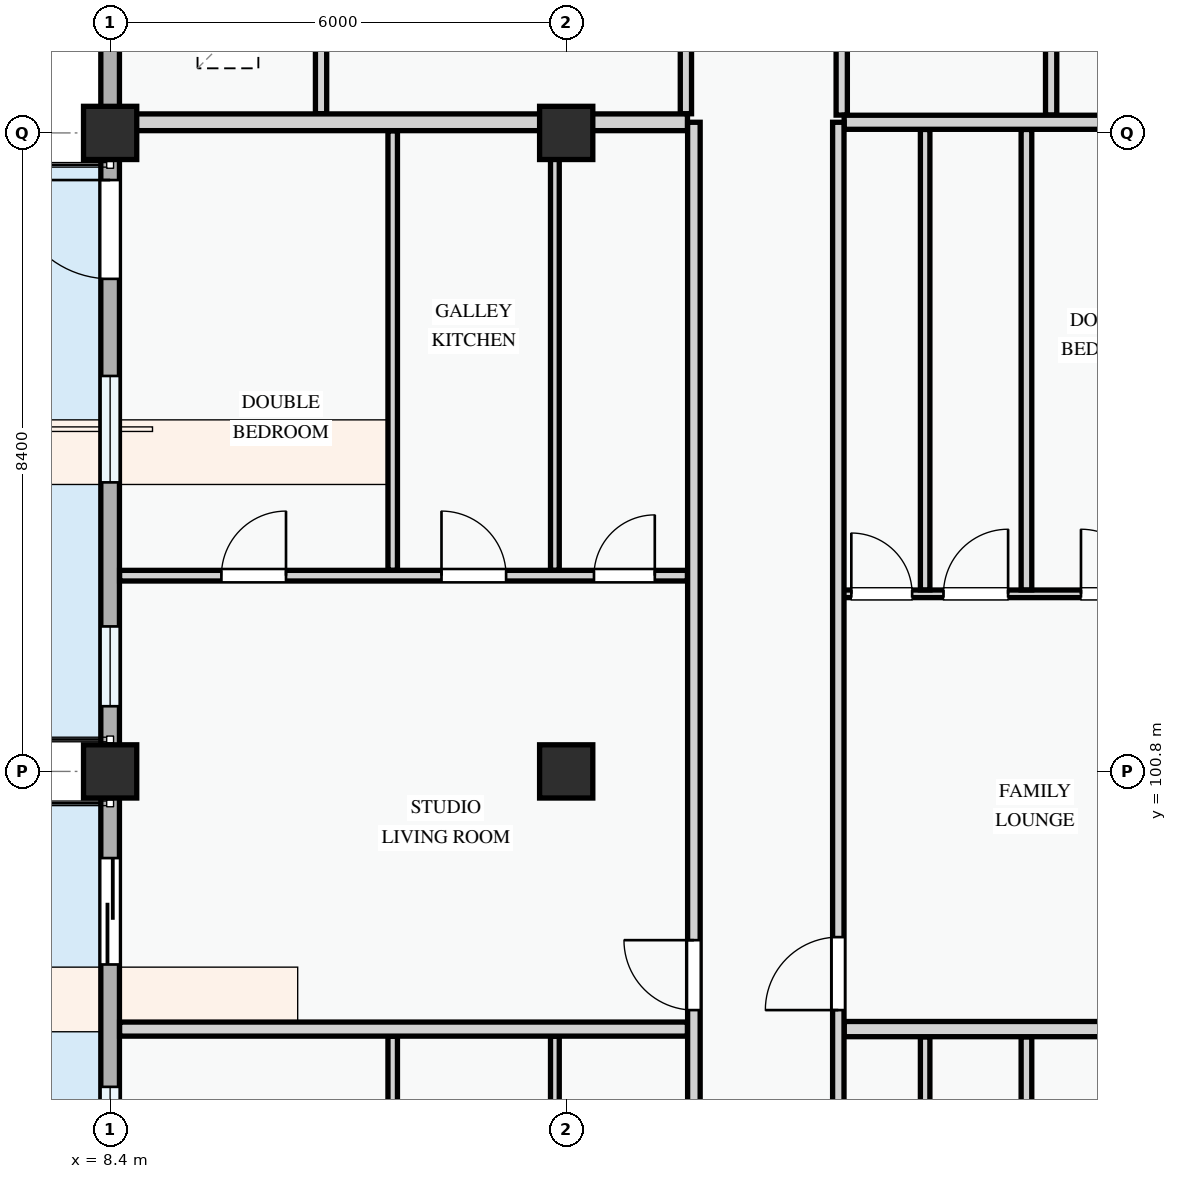
"""IFC4 building model, lengths in metres.
Left out: names, types, materials, properties, quantities, classifications, styles, units other than length and angle.
Written with IfcOpenShell. Run it as: python <this file> out.ifc"""

import sys

from ifc_helpers import new_model, si_unit, direction, frame, frame_2d, origin, origin_2d, place, context, subcontext, project, spatial, rectangle, extrude, element, fill, save


model = new_model("IFC4")
c1 = context("Model", 3, precision=1e-05, world=origin(), true_north=direction((0.0, 1.0)))
c2 = subcontext(c1, "Body", "Model", "MODEL_VIEW")
j1 = project(units=[si_unit("LENGTHUNIT", "METRE"), si_unit("PLANEANGLEUNIT", "RADIAN")], contexts=[c1])
p1 = place(None, origin())
s1 = spatial("IfcSite", under=j1, at=p1, CompositionType="ELEMENT")
p2 = place(p1, origin())
s2 = spatial("IfcBuilding", under=s1, at=p2, CompositionType="ELEMENT")
p3 = place(p2, frame((0.0, 0.0, 8.1)))
s3 = spatial("IfcBuildingStorey", under=s2, at=p3, CompositionType="ELEMENT", Elevation=8.1)
for number, where, z_axis, x_axis in (
    (1, (8.4, 100.8, 0.0), (0.0, 0.0, 1.0), (1.0, 0.0, 0.0)),
    (2, (8.4, 109.2, 0.0), (0.0, 0.0, 1.0), (1.0, 0.0, 0.0)),
    (3, (14.4, 100.8, 0.0), (0.0, 0.0, 1.0), (1.0, 0.0, 0.0)),
    (4, (14.4, 109.2, 0.0), (0.0, 0.0, 1.0), (1.0, 0.0, 0.0)),
):
    element("IfcColumn", number, at=place(p3, frame(where, z_axis=z_axis, x_axis=x_axis)), inside=s3, PredefinedType="COLUMN", context=c2, shape_type="SweptSolid", body=[
        extrude(rectangle(XDim=0.7, YDim=0.7, at=origin_2d()), origin(), (0.0, 0.0, 1.0), 3.3),
    ])
p4 = place(p3, frame((8.4, 115.2, 0.0), z_axis=(0.0, 0.0, 1.0), x_axis=(0.0, -1.0, 0.0)))
e5 = element("IfcWall", 5, at=p4, inside=s3, PredefinedType="STANDARD", context=c2, shape_type="SweptSolid", body=[
    extrude(rectangle(XDim=6.0, YDim=0.245, at=frame_2d((3.0, 0.0))), origin(), (0.0, 0.0, 1.0), 2.445),
])
p5 = place(p4, frame((0.545, 0.0, 0.78)))
e6 = element("IfcOpeningElement", 6, at=p5, cuts=e5, PredefinedType="OPENING", context=c2, shape_type="SweptSolid", body=[
    extrude(rectangle(XDim=0.9, YDim=1.2, at=frame_2d((0.45, 0.6))), frame((0.0, 0.133, 0.0), z_axis=(0.0, -1.0, 0.0), x_axis=(1.0, 0.0, 0.0)), (0.0, 0.0, 1.0), 0.265),
])
p6 = place(p4, frame((3.065, 0.0, 0.78)))
e7 = element("IfcOpeningElement", 7, at=p6, cuts=e5, PredefinedType="OPENING", context=c2, shape_type="SweptSolid", body=[
    extrude(rectangle(XDim=1.48, YDim=1.52, at=frame_2d((0.74, 0.76))), frame((0.0, 0.133, 0.0), z_axis=(0.0, -1.0, 0.0), x_axis=(1.0, 0.0, 0.0)), (0.0, 0.0, 1.0), 0.265),
])
p7 = place(p3, frame((8.4, 109.2, 0.0), z_axis=(0.0, 0.0, 1.0), x_axis=(0.0, -1.0, 0.0)))
e8 = element("IfcWall", 8, at=p7, inside=s3, PredefinedType="STANDARD", context=c2, shape_type="SweptSolid", body=[
    extrude(rectangle(XDim=8.4, YDim=0.245, at=frame_2d((4.2, 0.0))), origin(), (0.0, 0.0, 1.0), 2.345),
])
p8 = place(p7, frame((0.62, 0.0, 0.0)))
e9 = element("IfcOpeningElement", 9, at=p8, cuts=e8, PredefinedType="OPENING", context=c2, shape_type="SweptSolid", body=[
    extrude(rectangle(XDim=1.3, YDim=2.15, at=frame_2d((0.65, 1.075))), frame((0.0, 0.133, 0.0), z_axis=(0.0, -1.0, 0.0), x_axis=(1.0, 0.0, 0.0)), (0.0, 0.0, 1.0), 0.265),
])
p9 = place(p7, frame((3.198, 0.0, 0.78)))
e10 = element("IfcOpeningElement", 10, at=p9, cuts=e8, PredefinedType="OPENING", context=c2, shape_type="SweptSolid", body=[
    extrude(rectangle(XDim=1.4, YDim=1.45, at=frame_2d((0.7, 0.725))), frame((0.0, 0.133, 0.0), z_axis=(0.0, -1.0, 0.0), x_axis=(1.0, 0.0, 0.0)), (0.0, 0.0, 1.0), 0.265),
])
p10 = place(p7, frame((6.492, 0.0, 0.78)))
e11 = element("IfcOpeningElement", 11, at=p10, cuts=e8, PredefinedType="OPENING", context=c2, shape_type="SweptSolid", body=[
    extrude(rectangle(XDim=1.05, YDim=1.2, at=frame_2d((0.525, 0.6))), frame((0.0, 0.133, 0.0), z_axis=(0.0, -1.0, 0.0), x_axis=(1.0, 0.0, 0.0)), (0.0, 0.0, 1.0), 0.265),
])
p11 = place(p3, frame((8.4, 100.8, 0.0), z_axis=(0.0, 0.0, 1.0), x_axis=(0.0, -1.0, 0.0)))
e12 = element("IfcWall", 12, at=p11, inside=s3, PredefinedType="STANDARD", context=c2, shape_type="SweptSolid", body=[
    extrude(rectangle(XDim=6.0, YDim=0.245, at=frame_2d((3.0, 0.0))), origin(), (0.0, 0.0, 1.0), 2.445),
])
p12 = place(p11, frame((1.14, 0.0, 0.0)))
e13 = element("IfcOpeningElement", 13, at=p12, cuts=e12, PredefinedType="OPENING", context=c2, shape_type="SweptSolid", body=[
    extrude(rectangle(XDim=1.4, YDim=2.2, at=frame_2d((0.7, 1.1))), frame((0.0, 0.133, 0.0), z_axis=(0.0, -1.0, 0.0), x_axis=(1.0, 0.0, 0.0)), (0.0, 0.0, 1.0), 0.265),
])
p13 = place(p11, frame((4.15, 0.0, 0.78)))
e14 = element("IfcOpeningElement", 14, at=p13, cuts=e12, PredefinedType="OPENING", context=c2, shape_type="SweptSolid", body=[
    extrude(rectangle(XDim=0.9, YDim=1.2, at=frame_2d((0.45, 0.6))), frame((0.0, 0.133, 0.0), z_axis=(0.0, -1.0, 0.0), x_axis=(1.0, 0.0, 0.0)), (0.0, 0.0, 1.0), 0.265),
])
for number, where, z_axis, x_axis in (
    (15, (11.175, 113.324, 0.0), (0.0, 0.0, 1.0), (0.0, -1.0, 0.0)),
    (16, (15.975, 113.324, 0.0), (0.0, 0.0, 1.0), (0.0, -1.0, 0.0)),
):
    element("IfcWall", number, at=place(p3, frame(where, z_axis=z_axis, x_axis=x_axis)), inside=s3, PredefinedType="PARTITIONING", context=c2, shape_type="SweptSolid", body=[
        extrude(rectangle(XDim=3.872, YDim=0.148, at=frame_2d((1.936, 0.0))), origin(), (0.0, 0.0, 1.0), 3.0),
    ])
for number, where, z_axis, x_axis in (
    (17, (18.025, 113.324, 0.0), (0.0, 0.0, 1.0), (0.0, -1.0, 0.0)),
    (18, (20.78, 113.324, 0.0), (0.0, 0.0, 1.0), (0.0, -1.0, 0.0)),
):
    element("IfcWall", number, at=place(p3, frame(where, z_axis=z_axis, x_axis=x_axis)), inside=s3, PredefinedType="PARTITIONING", context=c2, shape_type="SweptSolid", body=[
        extrude(rectangle(XDim=3.889, YDim=0.148, at=frame_2d((1.945, 0.0))), origin(), (0.0, 0.0, 1.0), 3.0),
    ])
p14 = place(p3, frame((12.118, 91.097, 0.0), z_axis=(0.0, 0.0, 1.0), x_axis=(0.0, 1.0, 0.0)))
e19 = element("IfcWall", 19, at=p14, inside=s3, PredefinedType="PARTITIONING", context=c2, shape_type="SweptSolid", body=[
    extrude(rectangle(XDim=6.219, YDim=0.125, at=frame_2d((3.109, 0.0))), origin(), (0.0, 0.0, 1.0), 3.0),
])
p15 = place(p3, frame((14.251, 91.097, 0.0), z_axis=(0.0, 0.0, 1.0), x_axis=(0.0, 1.0, 0.0)))
e20 = element("IfcWall", 20, at=p15, inside=s3, PredefinedType="PARTITIONING", context=c2, shape_type="SweptSolid", body=[
    extrude(rectangle(XDim=6.219, YDim=0.115, at=frame_2d((3.109, 0.0))), origin(), (0.0, 0.0, 1.0), 2.425),
])
p16 = place(p3, frame((20.455, 90.822, 0.0), z_axis=(0.0, 0.0, 1.0), x_axis=(0.0, 1.0, 0.0)))
e21 = element("IfcWall", 21, at=p16, inside=s3, PredefinedType="PARTITIONING", context=c2, shape_type="SweptSolid", body=[
    extrude(rectangle(XDim=6.487, YDim=0.14, at=frame_2d((3.243, 0.0))), origin(), (0.0, 0.0, 1.0), 3.0),
])
p17 = place(p3, frame((19.122, 90.822, 0.0), z_axis=(0.0, 0.0, 1.0), x_axis=(0.0, 1.0, 0.0)))
e22 = element("IfcWall", 22, at=p17, inside=s3, PredefinedType="PARTITIONING", context=c2, shape_type="SweptSolid", body=[
    extrude(rectangle(XDim=6.487, YDim=0.125, at=frame_2d((3.243, 0.0))), origin(), (0.0, 0.0, 1.0), 3.0),
])
p18 = place(p3, frame((8.524, 103.375, 0.0), z_axis=(0.0, 0.0, 1.0), x_axis=(1.0, 0.0, 0.0)))
e23 = element("IfcWall", 23, at=p18, inside=s3, PredefinedType="PARTITIONING", context=c2, shape_type="SweptSolid", body=[
    extrude(rectangle(XDim=7.471, YDim=0.14, at=frame_2d((3.736, 0.0))), origin(), (0.0, 0.0, 1.0), 3.0),
])
p19 = place(p18, frame((1.339, 0.0, 0.0)))
e24 = element("IfcOpeningElement", 24, at=p19, cuts=e23, PredefinedType="OPENING", context=c2, shape_type="SweptSolid", body=[
    extrude(rectangle(XDim=0.85, YDim=2.1, at=frame_2d((0.425, 1.05))), frame((0.0, 0.08, 0.0), z_axis=(0.0, -1.0, 0.0), x_axis=(1.0, 0.0, 0.0)), (0.0, 0.0, 1.0), 0.16),
])
p20 = place(p18, frame((4.235, 0.0, 0.0)))
e25 = element("IfcOpeningElement", 25, at=p20, cuts=e23, PredefinedType="OPENING", context=c2, shape_type="SweptSolid", body=[
    extrude(rectangle(XDim=0.85, YDim=2.1, at=frame_2d((0.425, 1.05))), frame((0.0, 0.08, 0.0), z_axis=(0.0, -1.0, 0.0), x_axis=(1.0, 0.0, 0.0)), (0.0, 0.0, 1.0), 0.16),
])
p21 = place(p18, frame((6.241, 0.0, 0.0)))
e26 = element("IfcOpeningElement", 26, at=p21, cuts=e23, PredefinedType="OPENING", context=c2, shape_type="SweptSolid", body=[
    extrude(rectangle(XDim=0.8, YDim=2.1, at=frame_2d((0.4, 1.05))), frame((0.0, 0.08, 0.0), z_axis=(0.0, -1.0, 0.0), x_axis=(1.0, 0.0, 0.0)), (0.0, 0.0, 1.0), 0.16),
])
p22 = place(p3, frame((12.118, 103.447, 0.0), z_axis=(0.0, 0.0, 1.0), x_axis=(0.0, 1.0, 0.0)))
e27 = element("IfcWall", 27, at=p22, inside=s3, PredefinedType="PARTITIONING", context=c2, shape_type="SweptSolid", body=[
    extrude(rectangle(XDim=5.781, YDim=0.125, at=frame_2d((2.891, 0.0))), origin(), (0.0, 0.0, 1.0), 3.0),
])
p23 = place(p3, frame((14.251, 103.447, 0.0), z_axis=(0.0, 0.0, 1.0), x_axis=(0.0, 1.0, 0.0)))
e28 = element("IfcWall", 28, at=p23, inside=s3, PredefinedType="PARTITIONING", context=c2, shape_type="SweptSolid", body=[
    extrude(rectangle(XDim=5.781, YDim=0.115, at=frame_2d((2.891, 0.0))), origin(), (0.0, 0.0, 1.0), 2.425),
])
p24 = place(p3, frame((17.98, 103.136, 0.0), z_axis=(0.0, 0.0, 1.0), x_axis=(1.0, 0.0, 0.0)))
e29 = element("IfcWall", 29, at=p24, inside=s3, PredefinedType="PARTITIONING", context=c2, shape_type="SweptSolid", body=[
    extrude(rectangle(XDim=4.696, YDim=0.1, at=frame_2d((2.348, 0.0))), origin(), (0.0, 0.0, 1.0), 3.0),
])
p25 = place(p24, frame((0.171, 0.0, 0.0)))
e30 = element("IfcOpeningElement", 30, at=p25, cuts=e29, PredefinedType="OPENING", context=c2, shape_type="SweptSolid", body=[
    extrude(rectangle(XDim=0.8, YDim=2.1, at=frame_2d((0.4, 1.05))), frame((0.0, 0.06, 0.0), z_axis=(0.0, -1.0, 0.0), x_axis=(1.0, 0.0, 0.0)), (0.0, 0.0, 1.0), 0.12),
])
p26 = place(p24, frame((1.384, 0.0, 0.0)))
e31 = element("IfcOpeningElement", 31, at=p26, cuts=e29, PredefinedType="OPENING", context=c2, shape_type="SweptSolid", body=[
    extrude(rectangle(XDim=0.85, YDim=2.1, at=frame_2d((0.425, 1.05))), frame((0.0, 0.06, 0.0), z_axis=(0.0, -1.0, 0.0), x_axis=(1.0, 0.0, 0.0)), (0.0, 0.0, 1.0), 0.12),
])
p27 = place(p24, frame((3.193, 0.0, 0.0)))
e32 = element("IfcOpeningElement", 32, at=p27, cuts=e29, PredefinedType="OPENING", context=c2, shape_type="SweptSolid", body=[
    extrude(rectangle(XDim=0.85, YDim=2.1, at=frame_2d((0.425, 1.05))), frame((0.0, 0.06, 0.0), z_axis=(0.0, -1.0, 0.0), x_axis=(1.0, 0.0, 0.0)), (0.0, 0.0, 1.0), 0.12),
])
p28 = place(p3, frame((20.455, 103.188, 0.0), z_axis=(0.0, 0.0, 1.0), x_axis=(0.0, 1.0, 0.0)))
e33 = element("IfcWall", 33, at=p28, inside=s3, PredefinedType="PARTITIONING", context=c2, shape_type="SweptSolid", body=[
    extrude(rectangle(XDim=6.057, YDim=0.14, at=frame_2d((3.029, 0.0))), origin(), (0.0, 0.0, 1.0), 3.0),
])
p29 = place(p3, frame((19.122, 103.188, 0.0), z_axis=(0.0, 0.0, 1.0), x_axis=(0.0, 1.0, 0.0)))
e34 = element("IfcWall", 34, at=p29, inside=s3, PredefinedType="PARTITIONING", context=c2, shape_type="SweptSolid", body=[
    extrude(rectangle(XDim=6.057, YDim=0.125, at=frame_2d((3.029, 0.0))), origin(), (0.0, 0.0, 1.0), 3.0),
])
p30 = place(p3, frame((8.524, 97.41, 0.0), z_axis=(0.0, 0.0, 1.0), x_axis=(1.0, 0.0, 0.0)))
e35 = element("IfcWall", 35, at=p30, inside=s3, PredefinedType="PARTITIONING", context=c2, shape_type="SweptSolid", body=[
    extrude(rectangle(XDim=7.471, YDim=0.185, at=frame_2d((3.736, 0.0))), origin(), (0.0, 0.0, 1.0), 3.0),
])
p31 = place(p3, frame((18.057, 97.41, 0.0), z_axis=(0.0, 0.0, 1.0), x_axis=(1.0, 0.0, 0.0)))
e36 = element("IfcWall", 36, at=p31, inside=s3, PredefinedType="PARTITIONING", context=c2, shape_type="SweptSolid", body=[
    extrude(rectangle(XDim=4.619, YDim=0.2, at=frame_2d((2.309, 0.0))), origin(), (0.0, 0.0, 1.0), 3.0),
])
p32 = place(p3, frame((8.524, 109.34, 0.0), z_axis=(0.0, 0.0, 1.0), x_axis=(1.0, 0.0, 0.0)))
e37 = element("IfcWall", 37, at=p32, inside=s3, PredefinedType="PARTITIONING", context=c2, shape_type="SweptSolid", body=[
    extrude(rectangle(XDim=7.471, YDim=0.22, at=frame_2d((3.736, 0.0))), origin(), (0.0, 0.0, 1.0), 2.375),
])
p33 = place(p3, frame((18.057, 109.34, 0.0), z_axis=(0.0, 0.0, 1.0), x_axis=(1.0, 0.0, 0.0)))
e38 = element("IfcWall", 38, at=p33, inside=s3, PredefinedType="PARTITIONING", context=c2, shape_type="SweptSolid", body=[
    extrude(rectangle(XDim=4.683, YDim=0.185, at=frame_2d((2.342, 0.0))), origin(), (0.0, 0.0, 1.0), 2.375),
])
p34 = place(p3, frame((16.08, 72.125, 0.0), z_axis=(0.0, 0.0, 1.0), x_axis=(0.0, 1.0, 0.0)))
e39 = element("IfcWall", 39, at=p34, inside=s3, PredefinedType="PARTITIONING", context=c2, shape_type="SweptSolid", body=[
    extrude(rectangle(XDim=37.216, YDim=0.165, at=frame_2d((18.608, 0.0))), origin(), (0.0, 0.0, 1.0), 3.0),
])
p35 = place(p34, frame((3.657, 0.0, 0.0)))
e40 = element("IfcOpeningElement", 40, at=p35, cuts=e39, PredefinedType="OPENING", context=c2, shape_type="SweptSolid", body=[
    extrude(rectangle(XDim=0.96, YDim=2.12, at=frame_2d((0.48, 1.06))), frame((0.0, 0.093, 0.0), z_axis=(0.0, -1.0, 0.0), x_axis=(1.0, 0.0, 0.0)), (0.0, 0.0, 1.0), 0.185),
])
p36 = place(p34, frame((17.69, 0.0, 0.0)))
e41 = element("IfcOpeningElement", 41, at=p36, cuts=e39, PredefinedType="OPENING", context=c2, shape_type="SweptSolid", body=[
    extrude(rectangle(XDim=0.92, YDim=2.1, at=frame_2d((0.46, 1.05))), frame((0.0, 0.093, 0.0), z_axis=(0.0, -1.0, 0.0), x_axis=(1.0, 0.0, 0.0)), (0.0, 0.0, 1.0), 0.185),
])
p37 = place(p34, frame((25.535, 0.0, 0.0)))
e42 = element("IfcOpeningElement", 42, at=p37, cuts=e39, PredefinedType="OPENING", context=c2, shape_type="SweptSolid", body=[
    extrude(rectangle(XDim=0.92, YDim=2.1, at=frame_2d((0.46, 1.05))), frame((0.0, 0.093, 0.0), z_axis=(0.0, -1.0, 0.0), x_axis=(1.0, 0.0, 0.0)), (0.0, 0.0, 1.0), 0.185),
])
p38 = place(p3, frame((17.98, 72.125, 0.0), z_axis=(0.0, 0.0, 1.0), x_axis=(0.0, 1.0, 0.0)))
e43 = element("IfcWall", 43, at=p38, inside=s3, PredefinedType="PARTITIONING", context=c2, shape_type="SweptSolid", body=[
    extrude(rectangle(XDim=37.216, YDim=0.15, at=frame_2d((18.608, 0.0))), origin(), (0.0, 0.0, 1.0), 3.0),
])
p39 = place(p38, frame((3.619, 0.0, 0.0)))
e44 = element("IfcOpeningElement", 44, at=p39, cuts=e43, PredefinedType="OPENING", context=c2, shape_type="SweptSolid", body=[
    extrude(rectangle(XDim=0.92, YDim=2.1, at=frame_2d((0.46, 1.05))), frame((0.0, 0.085, 0.0), z_axis=(0.0, -1.0, 0.0), x_axis=(1.0, 0.0, 0.0)), (0.0, 0.0, 1.0), 0.17),
])
p40 = place(p38, frame((17.435, 0.0, 0.0)))
e45 = element("IfcOpeningElement", 45, at=p40, cuts=e43, PredefinedType="OPENING", context=c2, shape_type="SweptSolid", body=[
    extrude(rectangle(XDim=0.92, YDim=2.1, at=frame_2d((0.46, 1.05))), frame((0.0, 0.085, 0.0), z_axis=(0.0, -1.0, 0.0), x_axis=(1.0, 0.0, 0.0)), (0.0, 0.0, 1.0), 0.17),
])
p41 = place(p38, frame((25.535, 0.0, 0.0)))
e46 = element("IfcOpeningElement", 46, at=p41, cuts=e43, PredefinedType="OPENING", context=c2, shape_type="SweptSolid", body=[
    extrude(rectangle(XDim=0.96, YDim=2.12, at=frame_2d((0.48, 1.06))), frame((0.0, 0.085, 0.0), z_axis=(0.0, -1.0, 0.0), x_axis=(1.0, 0.0, 0.0)), (0.0, 0.0, 1.0), 0.17),
])
p42 = place(p8, frame((1.3, 0.0, 0.0), z_axis=(0.0, 0.0, 1.0), x_axis=(-1.0, 0.0, 0.0)))
e47 = element("IfcDoor", 47, at=p42, inside=s3, OperationType="SINGLE_SWING_RIGHT", PredefinedType="DOOR", context=c2, shape_type="SweptSolid", body=[
    extrude(rectangle(XDim=1.3, YDim=2.15, at=frame_2d((0.65, 1.075))), frame((0.0, 0.025, 0.0), z_axis=(0.0, -1.0, 0.0), x_axis=(1.0, 0.0, 0.0)), (0.0, 0.0, 1.0), 0.05),
])
fill(e9, e47)
p43 = place(p9, origin())
e48 = element("IfcWindow", 48, at=p43, inside=s3, PartitioningType="SINGLE_PANEL", PredefinedType="WINDOW", context=c2, shape_type="SweptSolid", body=[
    extrude(rectangle(XDim=1.4, YDim=1.45, at=frame_2d((0.7, 0.725))), frame((0.0, 0.03, 0.0), z_axis=(0.0, -1.0, 0.0), x_axis=(1.0, 0.0, 0.0)), (0.0, 0.0, 1.0), 0.06),
])
fill(e10, e48)
p44 = place(p10, origin())
e49 = element("IfcWindow", 49, at=p44, inside=s3, PartitioningType="SINGLE_PANEL", PredefinedType="WINDOW", context=c2, shape_type="SweptSolid", body=[
    extrude(rectangle(XDim=1.05, YDim=1.2, at=frame_2d((0.525, 0.6))), frame((0.0, 0.03, 0.0), z_axis=(0.0, -1.0, 0.0), x_axis=(1.0, 0.0, 0.0)), (0.0, 0.0, 1.0), 0.06),
])
fill(e11, e49)
p45 = place(p12, frame((1.4, 0.0, 0.0), z_axis=(0.0, 0.0, 1.0), x_axis=(-1.0, 0.0, 0.0)))
e50 = element("IfcDoor", 50, at=p45, inside=s3, OperationType="SLIDING_TO_LEFT", PredefinedType="DOOR", context=c2, shape_type="SweptSolid", body=[
    extrude(rectangle(XDim=1.4, YDim=2.2, at=frame_2d((0.7, 1.1))), frame((0.0, 0.025, 0.0), z_axis=(0.0, -1.0, 0.0), x_axis=(1.0, 0.0, 0.0)), (0.0, 0.0, 1.0), 0.05),
])
fill(e13, e50)
p46 = place(p13, origin())
e51 = element("IfcWindow", 51, at=p46, inside=s3, PartitioningType="SINGLE_PANEL", PredefinedType="WINDOW", context=c2, shape_type="SweptSolid", body=[
    extrude(rectangle(XDim=0.9, YDim=1.2, at=frame_2d((0.45, 0.6))), frame((0.0, 0.03, 0.0), z_axis=(0.0, -1.0, 0.0), x_axis=(1.0, 0.0, 0.0)), (0.0, 0.0, 1.0), 0.06),
])
fill(e14, e51)
p47 = place(p19, origin())
e52 = element("IfcDoor", 52, at=p47, inside=s3, OperationType="SINGLE_SWING_RIGHT", PredefinedType="DOOR", context=c2, shape_type="SweptSolid", body=[
    extrude(rectangle(XDim=0.85, YDim=2.1, at=frame_2d((0.425, 1.05))), frame((0.0, 0.025, 0.0), z_axis=(0.0, -1.0, 0.0), x_axis=(1.0, 0.0, 0.0)), (0.0, 0.0, 1.0), 0.05),
])
fill(e24, e52)
p48 = place(p20, origin())
e53 = element("IfcDoor", 53, at=p48, inside=s3, OperationType="SINGLE_SWING_LEFT", PredefinedType="DOOR", context=c2, shape_type="SweptSolid", body=[
    extrude(rectangle(XDim=0.85, YDim=2.1, at=frame_2d((0.425, 1.05))), frame((0.0, 0.025, 0.0), z_axis=(0.0, -1.0, 0.0), x_axis=(1.0, 0.0, 0.0)), (0.0, 0.0, 1.0), 0.05),
])
fill(e25, e53)
p49 = place(p21, origin())
e54 = element("IfcDoor", 54, at=p49, inside=s3, OperationType="SINGLE_SWING_RIGHT", PredefinedType="DOOR", context=c2, shape_type="SweptSolid", body=[
    extrude(rectangle(XDim=0.8, YDim=2.1, at=frame_2d((0.4, 1.05))), frame((0.0, 0.025, 0.0), z_axis=(0.0, -1.0, 0.0), x_axis=(1.0, 0.0, 0.0)), (0.0, 0.0, 1.0), 0.05),
])
fill(e26, e54)
p50 = place(p25, origin())
e55 = element("IfcDoor", 55, at=p50, inside=s3, OperationType="SINGLE_SWING_LEFT", PredefinedType="DOOR", context=c2, shape_type="SweptSolid", body=[
    extrude(rectangle(XDim=0.8, YDim=2.1, at=frame_2d((0.4, 1.05))), frame((0.0, 0.025, 0.0), z_axis=(0.0, -1.0, 0.0), x_axis=(1.0, 0.0, 0.0)), (0.0, 0.0, 1.0), 0.05),
])
fill(e30, e55)
p51 = place(p26, origin())
e56 = element("IfcDoor", 56, at=p51, inside=s3, OperationType="SINGLE_SWING_RIGHT", PredefinedType="DOOR", context=c2, shape_type="SweptSolid", body=[
    extrude(rectangle(XDim=0.85, YDim=2.1, at=frame_2d((0.425, 1.05))), frame((0.0, 0.025, 0.0), z_axis=(0.0, -1.0, 0.0), x_axis=(1.0, 0.0, 0.0)), (0.0, 0.0, 1.0), 0.05),
])
fill(e31, e56)
p52 = place(p27, origin())
e57 = element("IfcDoor", 57, at=p52, inside=s3, OperationType="SINGLE_SWING_LEFT", PredefinedType="DOOR", context=c2, shape_type="SweptSolid", body=[
    extrude(rectangle(XDim=0.85, YDim=2.1, at=frame_2d((0.425, 1.05))), frame((0.0, 0.025, 0.0), z_axis=(0.0, -1.0, 0.0), x_axis=(1.0, 0.0, 0.0)), (0.0, 0.0, 1.0), 0.05),
])
fill(e32, e57)
p53 = place(p37, origin())
e58 = element("IfcDoor", 58, at=p53, inside=s3, OperationType="SINGLE_SWING_RIGHT", PredefinedType="DOOR", context=c2, shape_type="SweptSolid", body=[
    extrude(rectangle(XDim=0.92, YDim=2.1, at=frame_2d((0.46, 1.05))), frame((0.0, 0.025, 0.0), z_axis=(0.0, -1.0, 0.0), x_axis=(1.0, 0.0, 0.0)), (0.0, 0.0, 1.0), 0.05),
])
fill(e42, e58)
p54 = place(p41, origin())
e59 = element("IfcDoor", 59, at=p54, inside=s3, OperationType="SINGLE_SWING_LEFT", PredefinedType="DOOR", context=c2, shape_type="SweptSolid", body=[
    extrude(rectangle(XDim=0.96, YDim=2.12, at=frame_2d((0.48, 1.06))), frame((0.0, 0.025, 0.0), z_axis=(0.0, -1.0, 0.0), x_axis=(1.0, 0.0, 0.0)), (0.0, 0.0, 1.0), 0.05),
])
fill(e46, e59)
save(model, sys.argv[1])
